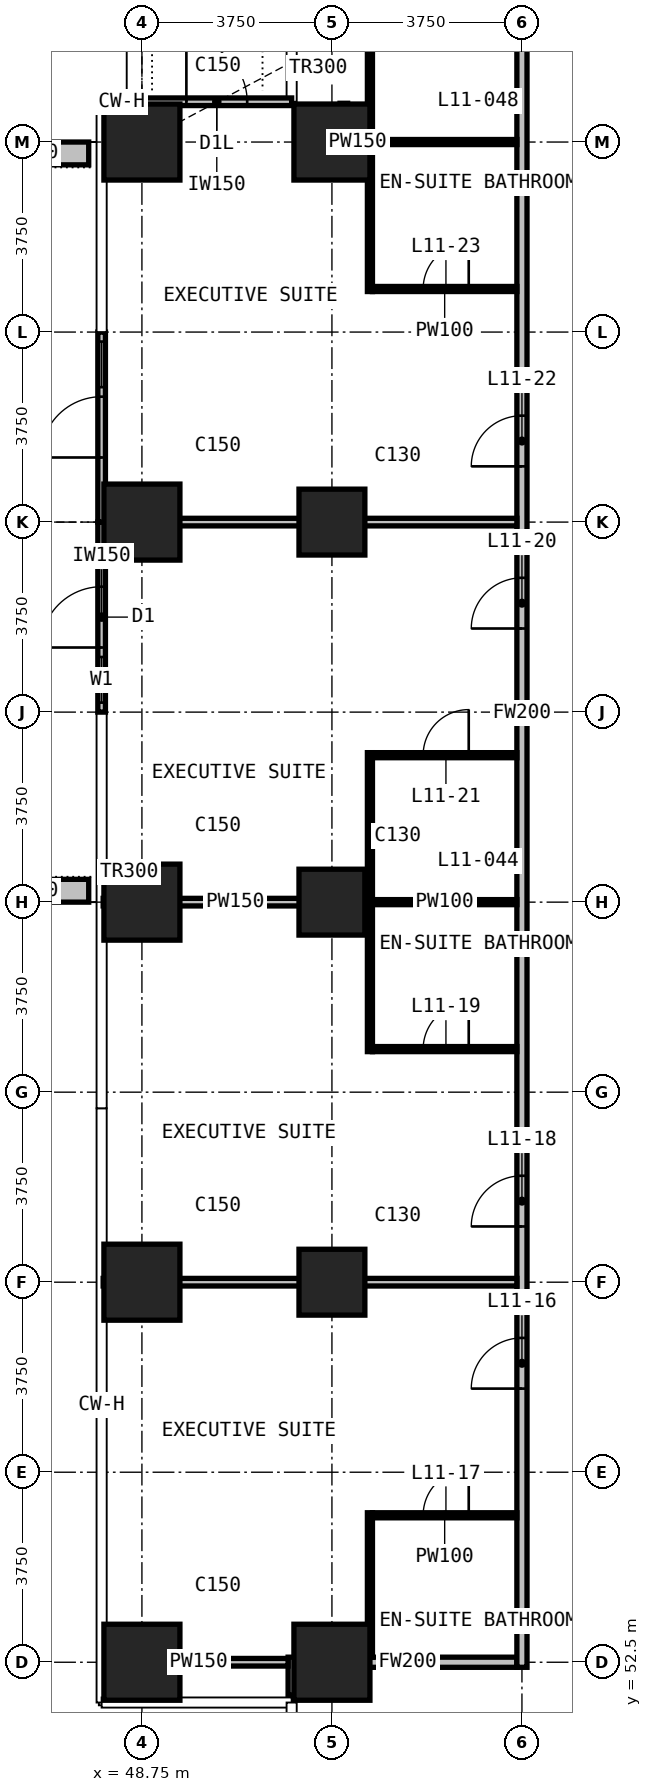
"""IFC4 building model, lengths in metres.
Left out: names, types, materials, properties, quantities, classifications, styles, units other than length and angle.
Written with IfcOpenShell. Run it as: python <this file> out.ifc"""

import sys

from ifc_helpers import new_model, si_unit, direction, frame, frame_2d, origin, origin_2d, place, context, subcontext, project, spatial, rectangle, extrude, element, fill, save


model = new_model("IFC4")
c1 = context("Model", 3, precision=1e-05, world=origin(), true_north=direction((0.0, 1.0)))
c2 = subcontext(c1, "Body", "Model", "MODEL_VIEW")
j1 = project(units=[si_unit("LENGTHUNIT", "METRE"), si_unit("PLANEANGLEUNIT", "RADIAN")], contexts=[c1])
p1 = place(None, origin())
s1 = spatial("IfcSite", under=j1, at=p1, CompositionType="ELEMENT")
p2 = place(p1, origin())
s2 = spatial("IfcBuilding", under=s1, at=p2, CompositionType="ELEMENT")
p3 = place(p2, frame((0.0, 0.0, 56.0)))
s3 = spatial("IfcBuildingStorey", under=s2, at=p3, CompositionType="ELEMENT", Elevation=56.0)
for number, where, z_axis, x_axis in (
    (1, (48.75, 52.5, 0.0), (0.0, 0.0, 1.0), (1.0, 0.0, 0.0)),
    (2, (48.75, 60.0, 0.0), (0.0, 0.0, 1.0), (1.0, 0.0, 0.0)),
    (3, (48.75, 67.5, 0.0), (0.0, 0.0, 1.0), (1.0, 0.0, 0.0)),
    (4, (48.75, 75.0, 0.0), (0.0, 0.0, 1.0), (1.0, 0.0, 0.0)),
    (5, (48.75, 82.5, 0.0), (0.0, 0.0, 1.0), (1.0, 0.0, 0.0)),
    (6, (52.5, 52.5, 0.0), (0.0, 0.0, 1.0), (1.0, 0.0, 0.0)),
):
    element("IfcColumn", number, at=place(p3, frame(where, z_axis=z_axis, x_axis=x_axis)), inside=s3, PredefinedType="COLUMN", context=c2, shape_type="SweptSolid", body=[
        extrude(rectangle(XDim=1.5, YDim=1.5, at=origin_2d()), origin(), (0.0, 0.0, 1.0), 3.3),
    ])
for number, where, z_axis, x_axis in (
    (7, (52.5, 60.0, 0.0), (0.0, 0.0, 1.0), (1.0, 0.0, 0.0)),
    (8, (52.5, 67.5, 0.0), (0.0, 0.0, 1.0), (1.0, 0.0, 0.0)),
    (9, (52.5, 75.0, 0.0), (0.0, 0.0, 1.0), (1.0, 0.0, 0.0)),
):
    element("IfcColumn", number, at=place(p3, frame(where, z_axis=z_axis, x_axis=x_axis)), inside=s3, PredefinedType="COLUMN", context=c2, shape_type="SweptSolid", body=[
        extrude(rectangle(XDim=1.3, YDim=1.3, at=origin_2d()), origin(), (0.0, 0.0, 1.0), 3.3),
    ])
p4 = place(p3, frame((52.5, 82.5, 0.0), z_axis=(0.0, 0.0, 1.0), x_axis=(1.0, 0.0, 0.0)))
e10 = element("IfcColumn", 10, at=p4, inside=s3, PredefinedType="COLUMN", context=c2, shape_type="SweptSolid", body=[
    extrude(rectangle(XDim=1.5, YDim=1.5, at=origin_2d()), origin(), (0.0, 0.0, 1.0), 3.3),
])
p5 = place(p3, frame((48.75, 83.295, 0.0), z_axis=(0.0, 0.0, 1.0), x_axis=(1.0, 0.0, 0.0)))
e11 = element("IfcWall", 11, at=p5, inside=s3, PredefinedType="SOLIDWALL", context=c2, shape_type="SweptSolid", body=[
    extrude(rectangle(XDim=2.955, YDim=0.15, at=frame_2d((1.478, 0.0))), origin(), (0.0, 0.0, 1.0), 3.0),
])
p6 = place(p5, frame((0.877, 0.0, 0.0)))
e12 = element("IfcOpeningElement", 12, at=p6, cuts=e11, PredefinedType="OPENING", context=c2, shape_type="SweptSolid", body=[
    extrude(rectangle(XDim=1.2, YDim=2.0, at=frame_2d((0.6, 1.0))), frame((0.0, 0.085, 0.0), z_axis=(0.0, -1.0, 0.0), x_axis=(1.0, 0.0, 0.0)), (0.0, 0.0, 1.0), 0.17),
])
p7 = place(p3, frame((47.955, 71.25, 0.0), z_axis=(0.0, 0.0, 1.0), x_axis=(0.0, 1.0, 0.0)))
e13 = element("IfcWall", 13, at=p7, inside=s3, PredefinedType="SOLIDWALL", context=c2, shape_type="SweptSolid", body=[
    extrude(rectangle(XDim=3.75, YDim=0.15, at=frame_2d((1.875, 0.0))), origin(), (0.0, 0.0, 1.0), 3.0),
])
p8 = place(p7, frame((0.188, 0.0, 0.1)))
e14 = element("IfcOpeningElement", 14, at=p8, cuts=e13, PredefinedType="OPENING", context=c2, shape_type="SweptSolid", body=[
    extrude(rectangle(XDim=0.9, YDim=2.4, at=frame_2d((0.45, 1.2))), frame((0.0, 0.085, 0.0), z_axis=(0.0, -1.0, 0.0), x_axis=(1.0, 0.0, 0.0)), (0.0, 0.0, 1.0), 0.17),
])
p9 = place(p7, frame((1.275, 0.0, 0.0)))
e15 = element("IfcOpeningElement", 15, at=p9, cuts=e13, PredefinedType="OPENING", context=c2, shape_type="SweptSolid", body=[
    extrude(rectangle(XDim=1.2, YDim=2.4, at=frame_2d((0.6, 1.2))), frame((0.0, 0.085, 0.0), z_axis=(0.0, -1.0, 0.0), x_axis=(1.0, 0.0, 0.0)), (0.0, 0.0, 1.0), 0.17),
])
p10 = place(p3, frame((47.955, 75.0, 0.0), z_axis=(0.0, 0.0, 1.0), x_axis=(0.0, 1.0, 0.0)))
e16 = element("IfcWall", 16, at=p10, inside=s3, PredefinedType="SOLIDWALL", context=c2, shape_type="SweptSolid", body=[
    extrude(rectangle(XDim=3.75, YDim=0.15, at=frame_2d((1.875, 0.0))), origin(), (0.0, 0.0, 1.0), 3.0),
])
p11 = place(p10, frame((1.275, 0.0, 0.0)))
e17 = element("IfcOpeningElement", 17, at=p11, cuts=e16, PredefinedType="OPENING", context=c2, shape_type="SweptSolid", body=[
    extrude(rectangle(XDim=1.2, YDim=2.4, at=frame_2d((0.6, 1.2))), frame((0.0, 0.085, 0.0), z_axis=(0.0, -1.0, 0.0), x_axis=(1.0, 0.0, 0.0)), (0.0, 0.0, 1.0), 0.17),
])
p12 = place(p10, frame((2.663, 0.0, 0.1)))
e18 = element("IfcOpeningElement", 18, at=p12, cuts=e16, PredefinedType="OPENING", context=c2, shape_type="SweptSolid", body=[
    extrude(rectangle(XDim=0.9, YDim=2.4, at=frame_2d((0.45, 1.2))), frame((0.0, 0.085, 0.0), z_axis=(0.0, -1.0, 0.0), x_axis=(1.0, 0.0, 0.0)), (0.0, 0.0, 1.0), 0.17),
])
for number, where, z_axis, x_axis in (
    (19, (47.7, 67.725, 0.0), (0.0, 0.0, 1.0), (-1.0, 0.0, 0.0)),
    (20, (47.7, 82.275, 0.0), (0.0, 0.0, 1.0), (-1.0, 0.0, 0.0)),
):
    element("IfcWall", number, at=place(p3, frame(where, z_axis=z_axis, x_axis=x_axis)), inside=s3, PredefinedType="USERDEFINED", context=c2, shape_type="SweptSolid", body=[
        extrude(rectangle(XDim=2.35, YDim=0.45, at=frame_2d((1.175, 0.0))), origin(), (0.0, 0.0, 1.0), 1.1),
    ])
p13 = place(p3, frame((51.835, 52.5, 0.0), z_axis=(0.0, 0.0, 1.0), x_axis=(1.0, 0.0, 0.0)))
e21 = element("IfcWall", 21, at=p13, inside=s3, PredefinedType="PARTITIONING", context=c2, shape_type="SweptSolid", body=[
    extrude(rectangle(XDim=4.315, YDim=0.2, at=frame_2d((2.157, 0.0))), origin(), (0.0, 0.0, 1.0), 3.0),
])
p14 = place(p3, frame((51.735, 51.855, 0.0), z_axis=(0.0, 0.0, 1.0), x_axis=(0.0, 1.0, 0.0)))
e22 = element("IfcWall", 22, at=p14, inside=s3, PredefinedType="PARTITIONING", context=c2, shape_type="SweptSolid", body=[
    extrude(rectangle(XDim=0.745, YDim=0.2, at=frame_2d((0.373, 0.0))), origin(), (0.0, 0.0, 1.0), 3.0),
])
p15 = place(p3, frame((56.25, 52.4, 0.0), z_axis=(0.0, 0.0, 1.0), x_axis=(0.0, 1.0, 0.0)))
e23 = element("IfcWall", 23, at=p15, inside=s3, PredefinedType="PARTITIONING", context=c2, shape_type="SweptSolid", body=[
    extrude(rectangle(XDim=37.675, YDim=0.2, at=frame_2d((18.837, 0.0))), origin(), (0.0, 0.0, 1.0), 3.0),
])
p16 = place(p15, frame((5.5, 0.0, 0.0)))
e24 = element("IfcOpeningElement", 24, at=p16, cuts=e23, PredefinedType="OPENING", context=c2, shape_type="SweptSolid", body=[
    extrude(rectangle(XDim=1.0, YDim=2.2, at=frame_2d((0.5, 1.1))), frame((0.0, 0.11, 0.0), z_axis=(0.0, -1.0, 0.0), x_axis=(1.0, 0.0, 0.0)), (0.0, 0.0, 1.0), 0.22),
])
p17 = place(p15, frame((8.7, 0.0, 0.0)))
e25 = element("IfcOpeningElement", 25, at=p17, cuts=e23, PredefinedType="OPENING", context=c2, shape_type="SweptSolid", body=[
    extrude(rectangle(XDim=1.0, YDim=2.2, at=frame_2d((0.5, 1.1))), frame((0.0, 0.11, 0.0), z_axis=(0.0, -1.0, 0.0), x_axis=(1.0, 0.0, 0.0)), (0.0, 0.0, 1.0), 0.22),
])
p18 = place(p15, frame((20.5, 0.0, 0.0)))
e26 = element("IfcOpeningElement", 26, at=p18, cuts=e23, PredefinedType="OPENING", context=c2, shape_type="SweptSolid", body=[
    extrude(rectangle(XDim=1.0, YDim=2.2, at=frame_2d((0.5, 1.1))), frame((0.0, 0.11, 0.0), z_axis=(0.0, -1.0, 0.0), x_axis=(1.0, 0.0, 0.0)), (0.0, 0.0, 1.0), 0.22),
])
p19 = place(p15, frame((23.7, 0.0, 0.0)))
e27 = element("IfcOpeningElement", 27, at=p19, cuts=e23, PredefinedType="OPENING", context=c2, shape_type="SweptSolid", body=[
    extrude(rectangle(XDim=1.0, YDim=2.2, at=frame_2d((0.5, 1.1))), frame((0.0, 0.11, 0.0), z_axis=(0.0, -1.0, 0.0), x_axis=(1.0, 0.0, 0.0)), (0.0, 0.0, 1.0), 0.22),
])
p20 = place(p15, frame((35.5, 0.0, 0.0)))
e28 = element("IfcOpeningElement", 28, at=p20, cuts=e23, PredefinedType="OPENING", context=c2, shape_type="SweptSolid", body=[
    extrude(rectangle(XDim=1.0, YDim=2.2, at=frame_2d((0.5, 1.1))), frame((0.0, 0.11, 0.0), z_axis=(0.0, -1.0, 0.0), x_axis=(1.0, 0.0, 0.0)), (0.0, 0.0, 1.0), 0.22),
])
p21 = place(p3, frame((48.105, 52.5, 0.0), z_axis=(0.0, 0.0, 1.0), x_axis=(1.0, 0.0, 0.0)))
e29 = element("IfcWall", 29, at=p21, inside=s3, PredefinedType="PARTITIONING", context=c2, shape_type="SweptSolid", body=[
    extrude(rectangle(XDim=3.53, YDim=0.15, at=frame_2d((1.765, 0.0))), origin(), (0.0, 0.0, 1.0), 3.0),
])
p22 = place(p3, frame((47.985, 60.0, 0.0), z_axis=(0.0, 0.0, 1.0), x_axis=(1.0, 0.0, 0.0)))
e30 = element("IfcWall", 30, at=p22, inside=s3, PredefinedType="PARTITIONING", context=c2, shape_type="SweptSolid", body=[
    extrude(rectangle(XDim=8.165, YDim=0.15, at=frame_2d((4.083, 0.0))), origin(), (0.0, 0.0, 1.0), 3.0),
])
p23 = place(p3, frame((47.985, 67.5, 0.0), z_axis=(0.0, 0.0, 1.0), x_axis=(1.0, 0.0, 0.0)))
e31 = element("IfcWall", 31, at=p23, inside=s3, PredefinedType="PARTITIONING", context=c2, shape_type="SweptSolid", body=[
    extrude(rectangle(XDim=5.215, YDim=0.15, at=frame_2d((2.607, 0.0))), origin(), (0.0, 0.0, 1.0), 3.0),
])
p24 = place(p3, frame((48.04, 75.0, 0.0), z_axis=(0.0, 0.0, 1.0), x_axis=(1.0, 0.0, 0.0)))
e32 = element("IfcWall", 32, at=p24, inside=s3, PredefinedType="PARTITIONING", context=c2, shape_type="SweptSolid", body=[
    extrude(rectangle(XDim=8.11, YDim=0.15, at=frame_2d((4.055, 0.0))), origin(), (0.0, 0.0, 1.0), 3.0),
])
p25 = place(p3, frame((52.81, 82.5, 0.0), z_axis=(0.0, 0.0, 1.0), x_axis=(1.0, 0.0, 0.0)))
e33 = element("IfcWall", 33, at=p25, inside=s3, PredefinedType="PARTITIONING", context=c2, shape_type="SweptSolid", body=[
    extrude(rectangle(XDim=0.39, YDim=0.15, at=frame_2d((0.195, 0.0))), origin(), (0.0, 0.0, 1.0), 3.0),
])
p26 = place(p3, frame((52.735, 82.425, 0.0), z_axis=(0.0, 0.0, 1.0), x_axis=(0.0, 1.0, 0.0)))
e34 = element("IfcWall", 34, at=p26, inside=s3, PredefinedType="PARTITIONING", context=c2, shape_type="SweptSolid", body=[
    extrude(rectangle(XDim=0.84, YDim=0.15, at=frame_2d((0.42, 0.0))), origin(), (0.0, 0.0, 1.0), 3.0),
])
p27 = place(p3, frame((53.3, 55.4, 0.0), z_axis=(0.0, 0.0, 1.0), x_axis=(1.0, 0.0, 0.0)))
e35 = element("IfcWall", 35, at=p27, inside=s3, PredefinedType="PARTITIONING", context=c2, shape_type="SweptSolid", body=[
    extrude(rectangle(XDim=2.85, YDim=0.1, at=frame_2d((1.425, 0.0))), origin(), (0.0, 0.0, 1.0), 3.0),
])
p28 = place(p27, frame((1.0, 0.0, 0.0)))
e36 = element("IfcOpeningElement", 36, at=p28, cuts=e35, PredefinedType="OPENING", context=c2, shape_type="SweptSolid", body=[
    extrude(rectangle(XDim=0.9, YDim=2.2, at=frame_2d((0.45, 1.1))), frame((0.0, 0.06, 0.0), z_axis=(0.0, -1.0, 0.0), x_axis=(1.0, 0.0, 0.0)), (0.0, 0.0, 1.0), 0.12),
])
p29 = place(p3, frame((53.3, 64.6, 0.0), z_axis=(0.0, 0.0, 1.0), x_axis=(1.0, 0.0, 0.0)))
e37 = element("IfcWall", 37, at=p29, inside=s3, PredefinedType="PARTITIONING", context=c2, shape_type="SweptSolid", body=[
    extrude(rectangle(XDim=2.85, YDim=0.1, at=frame_2d((1.425, 0.0))), origin(), (0.0, 0.0, 1.0), 3.0),
])
p30 = place(p29, frame((1.0, 0.0, 0.0)))
e38 = element("IfcOpeningElement", 38, at=p30, cuts=e37, PredefinedType="OPENING", context=c2, shape_type="SweptSolid", body=[
    extrude(rectangle(XDim=0.9, YDim=2.2, at=frame_2d((0.45, 1.1))), frame((0.0, 0.06, 0.0), z_axis=(0.0, -1.0, 0.0), x_axis=(1.0, 0.0, 0.0)), (0.0, 0.0, 1.0), 0.12),
])
p31 = place(p3, frame((53.3, 67.5, 0.0), z_axis=(0.0, 0.0, 1.0), x_axis=(1.0, 0.0, 0.0)))
e39 = element("IfcWall", 39, at=p31, inside=s3, PredefinedType="PARTITIONING", context=c2, shape_type="SweptSolid", body=[
    extrude(rectangle(XDim=2.85, YDim=0.1, at=frame_2d((1.425, 0.0))), origin(), (0.0, 0.0, 1.0), 3.0),
])
p32 = place(p3, frame((53.3, 70.4, 0.0), z_axis=(0.0, 0.0, 1.0), x_axis=(1.0, 0.0, 0.0)))
e40 = element("IfcWall", 40, at=p32, inside=s3, PredefinedType="PARTITIONING", context=c2, shape_type="SweptSolid", body=[
    extrude(rectangle(XDim=2.85, YDim=0.1, at=frame_2d((1.425, 0.0))), origin(), (0.0, 0.0, 1.0), 3.0),
])
p33 = place(p32, frame((1.0, 0.0, 0.0)))
e41 = element("IfcOpeningElement", 41, at=p33, cuts=e40, PredefinedType="OPENING", context=c2, shape_type="SweptSolid", body=[
    extrude(rectangle(XDim=0.9, YDim=2.2, at=frame_2d((0.45, 1.1))), frame((0.0, 0.06, 0.0), z_axis=(0.0, -1.0, 0.0), x_axis=(1.0, 0.0, 0.0)), (0.0, 0.0, 1.0), 0.12),
])
p34 = place(p3, frame((53.3, 79.6, 0.0), z_axis=(0.0, 0.0, 1.0), x_axis=(1.0, 0.0, 0.0)))
e42 = element("IfcWall", 42, at=p34, inside=s3, PredefinedType="PARTITIONING", context=c2, shape_type="SweptSolid", body=[
    extrude(rectangle(XDim=2.85, YDim=0.1, at=frame_2d((1.425, 0.0))), origin(), (0.0, 0.0, 1.0), 3.0),
])
p35 = place(p34, frame((1.0, 0.0, 0.0)))
e43 = element("IfcOpeningElement", 43, at=p35, cuts=e42, PredefinedType="OPENING", context=c2, shape_type="SweptSolid", body=[
    extrude(rectangle(XDim=0.9, YDim=2.2, at=frame_2d((0.45, 1.1))), frame((0.0, 0.06, 0.0), z_axis=(0.0, -1.0, 0.0), x_axis=(1.0, 0.0, 0.0)), (0.0, 0.0, 1.0), 0.12),
])
for number, where, z_axis, x_axis in (
    (44, (53.3, 82.5, 0.0), (0.0, 0.0, 1.0), (1.0, 0.0, 0.0)),
    (45, (53.25, 52.6, 0.0), (0.0, 0.0, 1.0), (0.0, 1.0, 0.0)),
):
    element("IfcWall", number, at=place(p3, frame(where, z_axis=z_axis, x_axis=x_axis)), inside=s3, PredefinedType="PARTITIONING", context=c2, shape_type="SweptSolid", body=[
        extrude(rectangle(XDim=2.85, YDim=0.1, at=frame_2d((1.425, 0.0))), origin(), (0.0, 0.0, 1.0), 3.0),
    ])
for number, where, z_axis, x_axis in (
    (46, (53.25, 64.55, 0.0), (0.0, 0.0, 1.0), (0.0, 1.0, 0.0)),
    (47, (53.25, 79.55, 0.0), (0.0, 0.0, 1.0), (0.0, 1.0, 0.0)),
):
    element("IfcWall", number, at=place(p3, frame(where, z_axis=z_axis, x_axis=x_axis)), inside=s3, PredefinedType="PARTITIONING", context=c2, shape_type="SweptSolid", body=[
        extrude(rectangle(XDim=5.9, YDim=0.1, at=frame_2d((2.95, 0.0))), origin(), (0.0, 0.0, 1.0), 3.0),
    ])
p36 = place(p6, origin())
e48 = element("IfcDoor", 48, at=p36, inside=s3, OperationType="SINGLE_SWING_LEFT", PredefinedType="DOOR", context=c2, shape_type="SweptSolid", body=[
    extrude(rectangle(XDim=1.2, YDim=2.0, at=frame_2d((0.6, 1.0))), frame((0.0, 0.025, 0.0), z_axis=(0.0, -1.0, 0.0), x_axis=(1.0, 0.0, 0.0)), (0.0, 0.0, 1.0), 0.05),
])
fill(e12, e48)
p37 = place(p8, origin())
e49 = element("IfcWindow", 49, at=p37, inside=s3, PartitioningType="SINGLE_PANEL", PredefinedType="WINDOW", context=c2, shape_type="SweptSolid", body=[
    extrude(rectangle(XDim=0.9, YDim=2.4, at=frame_2d((0.45, 1.2))), frame((0.0, 0.03, 0.0), z_axis=(0.0, -1.0, 0.0), x_axis=(1.0, 0.0, 0.0)), (0.0, 0.0, 1.0), 0.06),
])
fill(e14, e49)
p38 = place(p9, origin())
e50 = element("IfcDoor", 50, at=p38, inside=s3, OperationType="SINGLE_SWING_LEFT", PredefinedType="DOOR", context=c2, shape_type="SweptSolid", body=[
    extrude(rectangle(XDim=1.2, YDim=2.4, at=frame_2d((0.6, 1.2))), frame((0.0, 0.025, 0.0), z_axis=(0.0, -1.0, 0.0), x_axis=(1.0, 0.0, 0.0)), (0.0, 0.0, 1.0), 0.05),
])
fill(e15, e50)
p39 = place(p11, origin())
e51 = element("IfcDoor", 51, at=p39, inside=s3, OperationType="SINGLE_SWING_LEFT", PredefinedType="DOOR", context=c2, shape_type="SweptSolid", body=[
    extrude(rectangle(XDim=1.2, YDim=2.4, at=frame_2d((0.6, 1.2))), frame((0.0, 0.025, 0.0), z_axis=(0.0, -1.0, 0.0), x_axis=(1.0, 0.0, 0.0)), (0.0, 0.0, 1.0), 0.05),
])
fill(e17, e51)
p40 = place(p12, origin())
e52 = element("IfcWindow", 52, at=p40, inside=s3, PartitioningType="SINGLE_PANEL", PredefinedType="WINDOW", context=c2, shape_type="SweptSolid", body=[
    extrude(rectangle(XDim=0.9, YDim=2.4, at=frame_2d((0.45, 1.2))), frame((0.0, 0.03, 0.0), z_axis=(0.0, -1.0, 0.0), x_axis=(1.0, 0.0, 0.0)), (0.0, 0.0, 1.0), 0.06),
])
fill(e18, e52)
p41 = place(p16, origin())
e53 = element("IfcDoor", 53, at=p41, inside=s3, OperationType="SINGLE_SWING_LEFT", PredefinedType="DOOR", context=c2, shape_type="SweptSolid", body=[
    extrude(rectangle(XDim=1.0, YDim=2.2, at=frame_2d((0.5, 1.1))), frame((0.0, 0.025, 0.0), z_axis=(0.0, -1.0, 0.0), x_axis=(1.0, 0.0, 0.0)), (0.0, 0.0, 1.0), 0.05),
])
fill(e24, e53)
p42 = place(p28, origin())
e54 = element("IfcDoor", 54, at=p42, inside=s3, OperationType="SINGLE_SWING_RIGHT", PredefinedType="DOOR", context=c2, shape_type="SweptSolid", body=[
    extrude(rectangle(XDim=0.9, YDim=2.2, at=frame_2d((0.45, 1.1))), frame((0.0, 0.025, 0.0), z_axis=(0.0, -1.0, 0.0), x_axis=(1.0, 0.0, 0.0)), (0.0, 0.0, 1.0), 0.05),
])
fill(e36, e54)
p43 = place(p17, origin())
e55 = element("IfcDoor", 55, at=p43, inside=s3, OperationType="SINGLE_SWING_RIGHT", PredefinedType="DOOR", context=c2, shape_type="SweptSolid", body=[
    extrude(rectangle(XDim=1.0, YDim=2.2, at=frame_2d((0.5, 1.1))), frame((0.0, 0.025, 0.0), z_axis=(0.0, -1.0, 0.0), x_axis=(1.0, 0.0, 0.0)), (0.0, 0.0, 1.0), 0.05),
])
fill(e25, e55)
p44 = place(p30, origin())
e56 = element("IfcDoor", 56, at=p44, inside=s3, OperationType="SINGLE_SWING_RIGHT", PredefinedType="DOOR", context=c2, shape_type="SweptSolid", body=[
    extrude(rectangle(XDim=0.9, YDim=2.2, at=frame_2d((0.45, 1.1))), frame((0.0, 0.025, 0.0), z_axis=(0.0, -1.0, 0.0), x_axis=(1.0, 0.0, 0.0)), (0.0, 0.0, 1.0), 0.05),
])
fill(e38, e56)
p45 = place(p18, origin())
e57 = element("IfcDoor", 57, at=p45, inside=s3, OperationType="SINGLE_SWING_LEFT", PredefinedType="DOOR", context=c2, shape_type="SweptSolid", body=[
    extrude(rectangle(XDim=1.0, YDim=2.2, at=frame_2d((0.5, 1.1))), frame((0.0, 0.025, 0.0), z_axis=(0.0, -1.0, 0.0), x_axis=(1.0, 0.0, 0.0)), (0.0, 0.0, 1.0), 0.05),
])
fill(e26, e57)
p46 = place(p33, origin())
e58 = element("IfcDoor", 58, at=p46, inside=s3, OperationType="SINGLE_SWING_RIGHT", PredefinedType="DOOR", context=c2, shape_type="SweptSolid", body=[
    extrude(rectangle(XDim=0.9, YDim=2.2, at=frame_2d((0.45, 1.1))), frame((0.0, 0.025, 0.0), z_axis=(0.0, -1.0, 0.0), x_axis=(1.0, 0.0, 0.0)), (0.0, 0.0, 1.0), 0.05),
])
fill(e41, e58)
p47 = place(p19, origin())
e59 = element("IfcDoor", 59, at=p47, inside=s3, OperationType="SINGLE_SWING_LEFT", PredefinedType="DOOR", context=c2, shape_type="SweptSolid", body=[
    extrude(rectangle(XDim=1.0, YDim=2.2, at=frame_2d((0.5, 1.1))), frame((0.0, 0.025, 0.0), z_axis=(0.0, -1.0, 0.0), x_axis=(1.0, 0.0, 0.0)), (0.0, 0.0, 1.0), 0.05),
])
fill(e27, e59)
p48 = place(p35, origin())
e60 = element("IfcDoor", 60, at=p48, inside=s3, OperationType="SINGLE_SWING_RIGHT", PredefinedType="DOOR", context=c2, shape_type="SweptSolid", body=[
    extrude(rectangle(XDim=0.9, YDim=2.2, at=frame_2d((0.45, 1.1))), frame((0.0, 0.025, 0.0), z_axis=(0.0, -1.0, 0.0), x_axis=(1.0, 0.0, 0.0)), (0.0, 0.0, 1.0), 0.05),
])
fill(e43, e60)
save(model, sys.argv[1])
